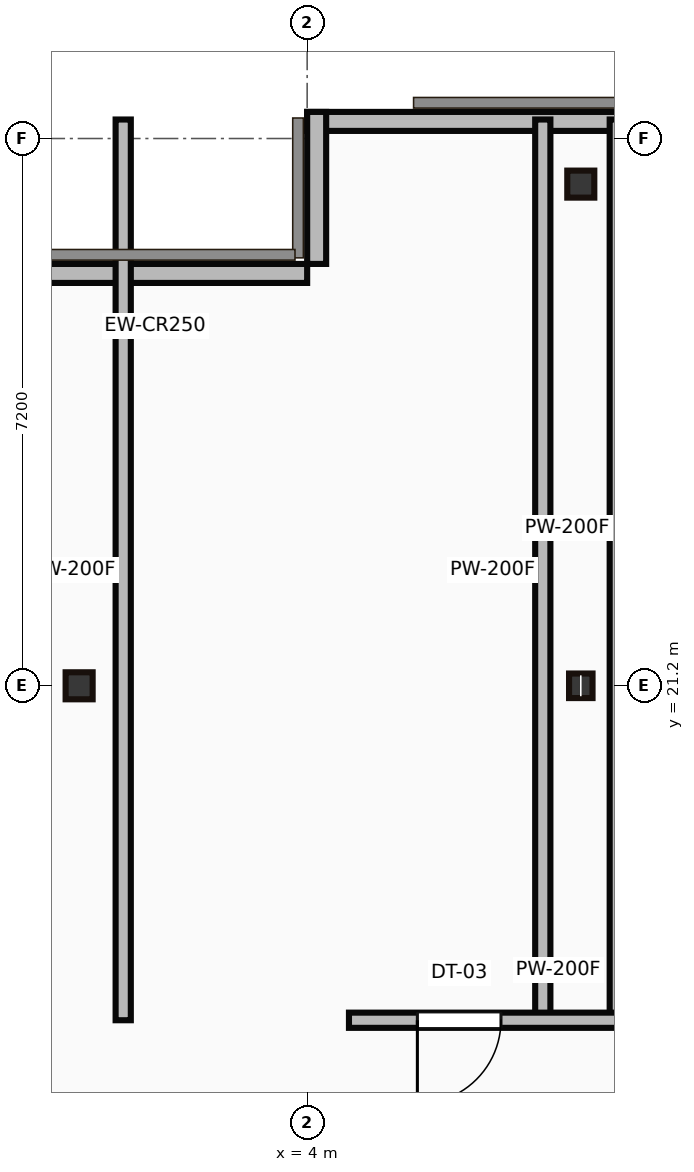
"""IFC4 building model, lengths in metres.
Left out: names, types, materials, properties, quantities, classifications, styles, units other than length and angle.
Written with IfcOpenShell. Run it as: python <this file> out.ifc"""

import sys

from ifc_helpers import new_model, si_unit, direction, frame, frame_2d, origin, origin_2d, place, context, subcontext, project, spatial, rectangle, hollow_rectangle, i_section, extrude, source, transform, mapped, element, fill, save


model = new_model("IFC4")
c1 = context("Model", 3, precision=1e-05, world=origin(), true_north=direction((0.0, 1.0)))
c2 = subcontext(c1, "Body", "Model", "MODEL_VIEW")
j1 = project(units=[si_unit("LENGTHUNIT", "METRE"), si_unit("PLANEANGLEUNIT", "RADIAN")], contexts=[c1])
p1 = place(None, origin())
s1 = spatial("IfcSite", under=j1, at=p1, CompositionType="ELEMENT")
p2 = place(p1, origin())
s2 = spatial("IfcBuilding", under=s1, at=p2, CompositionType="ELEMENT")
p3 = place(p2, frame((0.0, 0.0, 311.25)))
s3 = spatial("IfcBuildingStorey", under=s2, at=p3, CompositionType="ELEMENT", Elevation=311.25)
m1 = source(origin(), c2, "Body", "SweptSolid", [
    extrude(hollow_rectangle(XDim=0.356, YDim=0.356, WallThickness=0.019, at=origin_2d()), origin(), (0.0, 0.0, 1.0), 3.8),
])
p4 = place(p3, frame((1.0, 21.2, 0.0), z_axis=(0.0, 0.0, 1.0), x_axis=(1.0, 0.0, 0.0)))
e1 = element("IfcColumn", 1, at=p4, inside=s3, PredefinedType="COLUMN", context=c2, shape_type="MappedRepresentation", body=[
    mapped(m1, transform((0.0, 0.0, 0.0))),
])
m2 = source(origin(), c2, "Body", "SweptSolid", [
    extrude(i_section(OverallWidth=0.309, OverallDepth=0.323, WebThickness=0.014, FlangeThickness=0.023, at=origin_2d()), origin(), (0.0, 0.0, 1.0), 3.8),
])
p5 = place(p3, frame((7.6, 21.2, 0.0), z_axis=(0.0, 0.0, 1.0), x_axis=(1.0, 0.0, 0.0)))
e2 = element("IfcColumn", 2, at=p5, inside=s3, PredefinedType="COLUMN", context=c2, shape_type="MappedRepresentation", body=[
    mapped(m2, transform((0.0, 0.0, 0.0))),
])
p6 = place(p3, frame((7.6, 27.8, 0.0), z_axis=(0.0, 0.0, 1.0), x_axis=(1.0, 0.0, 0.0)))
e3 = element("IfcColumn", 3, at=p6, inside=s3, PredefinedType="COLUMN", context=c2, shape_type="MappedRepresentation", body=[
    mapped(m1, transform((0.0, 0.0, 0.0))),
])
m3 = source(origin(), c2, "Body", "SweptSolid", [
    extrude(rectangle(XDim=35.0, YDim=0.25, at=frame_2d((17.5, 0.0))), origin(), (0.0, 0.0, 1.0), 3.5),
])
p7 = place(p3, frame((39.0, 28.625, 0.0), z_axis=(0.0, 0.0, 1.0), x_axis=(-1.0, 0.0, 0.0)))
e4 = element("IfcWall", 4, at=p7, inside=s3, PredefinedType="STANDARD", context=c2, shape_type="MappedRepresentation", body=[
    mapped(m3, transform((0.0, 0.0, 0.0))),
])
m4 = source(origin(), c2, "Body", "SweptSolid", [
    extrude(rectangle(XDim=2.0, YDim=0.25, at=frame_2d((1.0, 0.0))), origin(), (0.0, 0.0, 1.0), 3.5),
])
p8 = place(p3, frame((4.125, 28.75, 0.0), z_axis=(0.0, 0.0, 1.0), x_axis=(0.0, -1.0, 0.0)))
e5 = element("IfcWall", 5, at=p8, inside=s3, PredefinedType="STANDARD", context=c2, shape_type="MappedRepresentation", body=[
    mapped(m4, transform((0.0, 0.0, 0.0))),
])
m5 = source(origin(), c2, "Body", "SweptSolid", [
    extrude(rectangle(XDim=4.0, YDim=0.25, at=frame_2d((2.0, 0.0))), origin(), (0.0, 0.0, 1.0), 3.5),
])
p9 = place(p3, frame((4.0, 26.625, 0.0), z_axis=(0.0, 0.0, 1.0), x_axis=(-1.0, 0.0, 0.0)))
e6 = element("IfcWall", 6, at=p9, inside=s3, PredefinedType="STANDARD", context=c2, shape_type="MappedRepresentation", body=[
    mapped(m5, transform((0.0, 0.0, 0.0))),
])
m6 = source(origin(), c2, "Body", "SweptSolid", [
    extrude(rectangle(XDim=11.85, YDim=0.2, at=frame_2d((5.925, 0.0))), origin(), (0.0, 0.0, 1.0), 3.5),
])
p10 = place(p3, frame((8.08, 16.8, 0.0), z_axis=(0.0, 0.0, 1.0), x_axis=(0.0, 1.0, 0.0)))
e7 = element("IfcWall", 7, at=p10, inside=s3, PredefinedType="PARTITIONING", context=c2, shape_type="MappedRepresentation", body=[
    mapped(m6, transform((0.0, 0.0, 0.0))),
])
m7 = source(origin(), c2, "Body", "SweptSolid", [
    extrude(rectangle(XDim=3.53, YDim=0.2, at=frame_2d((1.765, 0.0))), origin(), (0.0, 0.0, 1.0), 3.5),
])
p11 = place(p3, frame((4.55, 16.8, 0.0), z_axis=(0.0, 0.0, 1.0), x_axis=(1.0, 0.0, 0.0)))
e8 = element("IfcWall", 8, at=p11, inside=s3, PredefinedType="PARTITIONING", context=c2, shape_type="MappedRepresentation", body=[
    mapped(m7, transform((0.0, 0.0, 0.0))),
])
p12 = place(p11, frame((0.9, 0.0, 0.0)))
e9 = element("IfcOpeningElement", 9, at=p12, cuts=e8, PredefinedType="OPENING", context=c2, shape_type="SweptSolid", body=[
    extrude(rectangle(XDim=1.1, YDim=2.15, at=frame_2d((0.55, 1.075))), frame((0.0, 0.11, 0.0), z_axis=(0.0, -1.0, 0.0), x_axis=(1.0, 0.0, 0.0)), (0.0, 0.0, 1.0), 0.22),
])
for number, where, z_axis, x_axis in (
    (10, (1.58, 16.8, 0.0), (0.0, 0.0, 1.0), (0.0, 1.0, 0.0)),
    (11, (7.1, 16.8, 0.0), (0.0, 0.0, 1.0), (0.0, 1.0, 0.0)),
):
    element("IfcWall", number, at=place(p3, frame(where, z_axis=z_axis, x_axis=x_axis)), inside=s3, PredefinedType="PARTITIONING", context=c2, shape_type="MappedRepresentation", body=[
        mapped(m6, transform((0.0, 0.0, 0.0))),
    ])
m8 = source(origin(), c2, "Body", "SweptSolid", [
    extrude(rectangle(XDim=1.1, YDim=2.15, at=frame_2d((0.55, 1.075))), frame((0.0, 0.025, 0.0), z_axis=(0.0, -1.0, 0.0), x_axis=(1.0, 0.0, 0.0)), (0.0, 0.0, 1.0), 0.05),
])
p13 = place(p12, origin())
e12 = element("IfcDoor", 12, at=p13, inside=s3, OperationType="SINGLE_SWING_LEFT", PredefinedType="DOOR", context=c2, shape_type="MappedRepresentation", body=[
    mapped(m8, transform((0.0, 0.0, 0.0))),
])
fill(e9, e12)
save(model, sys.argv[1])
